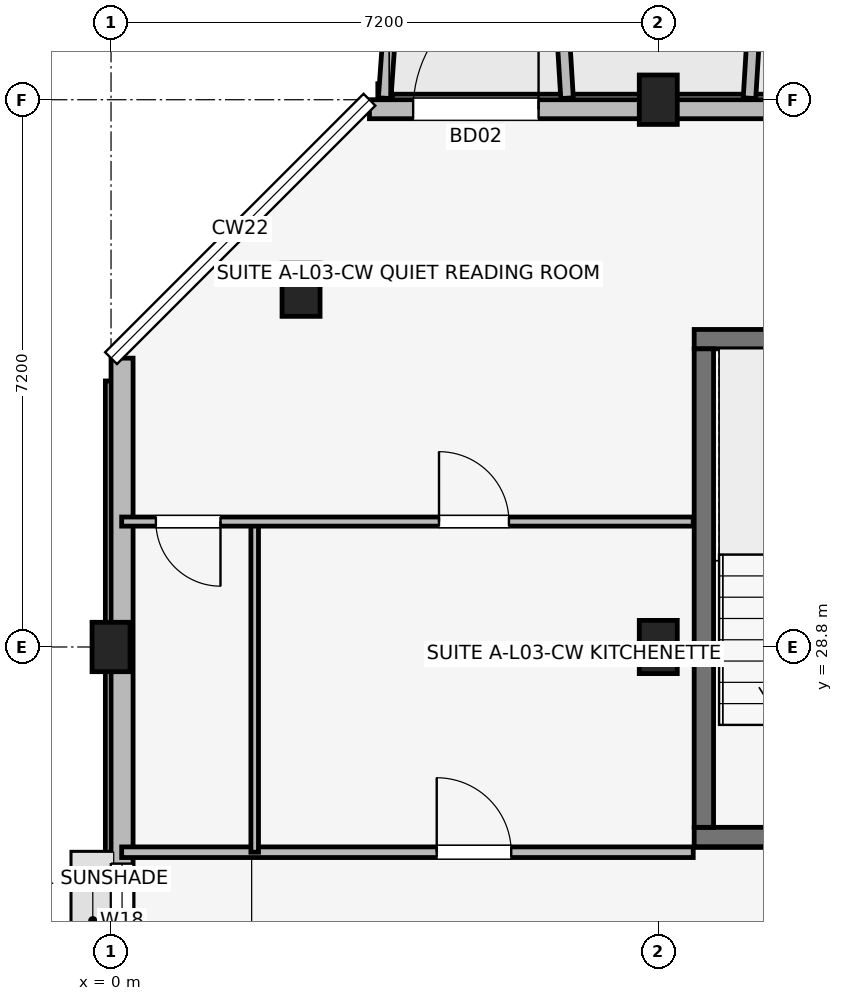
"""IFC4 building model, lengths in metres.
Left out: names, types, materials, properties, quantities, classifications, styles, units other than length and angle.
Written with IfcOpenShell. Run it as: python <this file> out.ifc"""

import sys

from ifc_helpers import new_model, si_unit, direction, frame, frame_2d, origin, origin_2d, place, context, subcontext, project, spatial, rectangle, extrude, element, fill, save


model = new_model("IFC4")
c1 = context("Model", 3, precision=1e-05, world=origin(), true_north=direction((0.0, 1.0)))
c2 = subcontext(c1, "Body", "Model", "MODEL_VIEW")
j1 = project(units=[si_unit("LENGTHUNIT", "METRE"), si_unit("PLANEANGLEUNIT", "RADIAN")], contexts=[c1])
p1 = place(None, origin())
s1 = spatial("IfcSite", under=j1, at=p1, CompositionType="ELEMENT")
p2 = place(p1, origin())
s2 = spatial("IfcBuilding", under=s1, at=p2, CompositionType="ELEMENT")
p3 = place(p2, frame((0.0, 0.0, 11.85)))
s3 = spatial("IfcBuildingStorey", under=s2, at=p3, CompositionType="ELEMENT", Elevation=11.85)
p4 = place(p3, frame((0.0, 28.8, 0.0), z_axis=(0.0, 0.0, 1.0), x_axis=(1.0, 0.0, 0.0)))
e1 = element("IfcColumn", 1, at=p4, inside=s3, PredefinedType="COLUMN", context=c2, shape_type="SweptSolid", body=[
    extrude(rectangle(XDim=0.5, YDim=0.65, at=origin_2d()), origin(), (0.0, 0.0, 1.0), 3.15),
])
for number, where, z_axis, x_axis in (
    (2, (2.5, 33.5, 0.0), (0.0, 0.0, 1.0), (1.0, 0.0, 0.0)),
    (3, (7.2, 28.8, 0.0), (0.0, 0.0, 1.0), (1.0, 0.0, 0.0)),
):
    element("IfcColumn", number, at=place(p3, frame(where, z_axis=z_axis, x_axis=x_axis)), inside=s3, PredefinedType="COLUMN", context=c2, shape_type="SweptSolid", body=[
        extrude(rectangle(XDim=0.5, YDim=0.7, at=origin_2d()), origin(), (0.0, 0.0, 1.0), 3.15),
    ])
p5 = place(p3, frame((7.2, 36.0, 0.0), z_axis=(0.0, 0.0, 1.0), x_axis=(1.0, 0.0, 0.0)))
e4 = element("IfcColumn", 4, at=p5, inside=s3, PredefinedType="COLUMN", context=c2, shape_type="SweptSolid", body=[
    extrude(rectangle(XDim=0.5, YDim=0.65, at=origin_2d()), origin(), (0.0, 0.0, 1.0), 3.15),
])
p6 = place(p3, frame((7.673, 26.3, 0.0), z_axis=(0.0, 0.0, 1.0), x_axis=(1.0, 0.0, 0.0)))
e5 = element("IfcWall", 5, at=p6, inside=s3, PredefinedType="SHEAR", context=c2, shape_type="SweptSolid", body=[
    extrude(rectangle(XDim=3.305, YDim=0.255, at=frame_2d((1.652, 0.0))), origin(), (0.0, 0.0, 1.0), 3.15),
])
p7 = place(p6, frame((2.177, 0.0, 0.0), z_axis=(0.0, 0.0, 1.0), x_axis=(-1.0, 0.0, 0.0)))
e6 = element("IfcOpeningElement", 6, at=p7, cuts=e5, PredefinedType="OPENING", context=c2, shape_type="SweptSolid", body=[
    extrude(rectangle(XDim=1.05, YDim=2.12, at=frame_2d((0.525, 1.06))), frame((0.0, 0.137, 0.0), z_axis=(0.0, -1.0, 0.0), x_axis=(1.0, 0.0, 0.0)), (0.0, 0.0, 1.0), 0.275),
])
p8 = place(p3, frame((7.673, 32.85, 0.0), z_axis=(0.0, 0.0, 1.0), x_axis=(1.0, 0.0, 0.0)))
e7 = element("IfcWall", 7, at=p8, inside=s3, PredefinedType="SHEAR", context=c2, shape_type="SweptSolid", body=[
    extrude(rectangle(XDim=3.305, YDim=0.255, at=frame_2d((1.652, 0.0))), origin(), (0.0, 0.0, 1.0), 3.15),
])
p9 = place(p3, frame((7.8, 26.427, 0.0), z_axis=(0.0, 0.0, 1.0), x_axis=(0.0, 1.0, 0.0)))
e8 = element("IfcWall", 8, at=p9, inside=s3, PredefinedType="SHEAR", context=c2, shape_type="SweptSolid", body=[
    extrude(rectangle(XDim=6.295, YDim=0.255, at=frame_2d((3.147, 0.0))), origin(), (0.0, 0.0, 1.0), 3.15),
])
p10 = place(p3, frame((32.6, 35.875, 0.0), z_axis=(0.0, 0.0, 1.0), x_axis=(-1.0, 0.0, 0.0)))
e9 = element("IfcWall", 9, at=p10, inside=s3, PredefinedType="SOLIDWALL", context=c2, shape_type="SweptSolid", body=[
    extrude(rectangle(XDim=29.2, YDim=0.25, at=frame_2d((14.6, 0.0))), origin(), (0.0, 0.0, 1.0), 2.43),
])
p11 = place(p10, frame((28.625, 0.0, 0.0), z_axis=(0.0, 0.0, 1.0), x_axis=(-1.0, 0.0, 0.0)))
e10 = element("IfcOpeningElement", 10, at=p11, cuts=e9, PredefinedType="OPENING", context=c2, shape_type="SweptSolid", body=[
    extrude(rectangle(XDim=1.65, YDim=2.15, at=frame_2d((0.825, 1.075))), frame((0.0, 0.135, 0.0), z_axis=(0.0, -1.0, 0.0), x_axis=(1.0, 0.0, 0.0)), (0.0, 0.0, 1.0), 0.27),
])
p12 = place(p10, frame((2.3, 0.0, 0.0), z_axis=(0.0, 0.0, 1.0), x_axis=(-1.0, 0.0, 0.0)))
e11 = element("IfcOpeningElement", 11, at=p12, cuts=e9, PredefinedType="OPENING", context=c2, shape_type="SweptSolid", body=[
    extrude(rectangle(XDim=1.8, YDim=2.15, at=frame_2d((0.9, 1.075))), frame((0.0, 0.135, 0.0), z_axis=(0.0, -1.0, 0.0), x_axis=(1.0, 0.0, 0.0)), (0.0, 0.0, 1.0), 0.27),
])
p13 = place(p10, frame((15.03, 0.0, 0.5)))
e12 = element("IfcOpeningElement", 12, at=p13, cuts=e9, PredefinedType="OPENING", context=c2, shape_type="SweptSolid", body=[
    extrude(rectangle(XDim=0.75, YDim=1.75, at=frame_2d((0.375, 0.875))), frame((0.0, 0.135, 0.0), z_axis=(0.0, -1.0, 0.0), x_axis=(1.0, 0.0, 0.0)), (0.0, 0.0, 1.0), 0.27),
])
p14 = place(p10, frame((7.675, 0.0, 0.67)))
e13 = element("IfcOpeningElement", 13, at=p14, cuts=e9, PredefinedType="OPENING", context=c2, shape_type="SweptSolid", body=[
    extrude(rectangle(XDim=2.0, YDim=1.65, at=frame_2d((1.0, 0.825))), frame((0.0, 0.135, 0.0), z_axis=(0.0, -1.0, 0.0), x_axis=(1.0, 0.0, 0.0)), (0.0, 0.0, 1.0), 0.27),
])
p15 = place(p10, frame((19.57, 0.0, 0.7)))
e14 = element("IfcOpeningElement", 14, at=p15, cuts=e9, PredefinedType="OPENING", context=c2, shape_type="SweptSolid", body=[
    extrude(rectangle(XDim=1.86, YDim=1.6, at=frame_2d((0.93, 0.8))), frame((0.0, 0.135, 0.0), z_axis=(0.0, -1.0, 0.0), x_axis=(1.0, 0.0, 0.0)), (0.0, 0.0, 1.0), 0.27),
])
p16 = place(p3, frame((0.145, 32.6, 0.0), z_axis=(0.0, 0.0, 1.0), x_axis=(0.0, -1.0, 0.0)))
e15 = element("IfcWall", 15, at=p16, inside=s3, PredefinedType="SOLIDWALL", context=c2, shape_type="SweptSolid", body=[
    extrude(rectangle(XDim=14.8, YDim=0.29, at=frame_2d((7.4, 0.0))), origin(), (0.0, 0.0, 1.0), 2.38),
])
p17 = place(p16, frame((6.65, 0.0, 1.05)))
e16 = element("IfcOpeningElement", 16, at=p17, cuts=e15, PredefinedType="OPENING", context=c2, shape_type="SweptSolid", body=[
    extrude(rectangle(XDim=1.5, YDim=1.15, at=frame_2d((0.75, 0.575))), frame((0.0, 0.155, 0.0), z_axis=(0.0, -1.0, 0.0), x_axis=(1.0, 0.0, 0.0)), (0.0, 0.0, 1.0), 0.31),
])
p18 = place(p16, frame((12.385, 0.0, 0.72)))
e17 = element("IfcOpeningElement", 17, at=p18, cuts=e15, PredefinedType="OPENING", context=c2, shape_type="SweptSolid", body=[
    extrude(rectangle(XDim=1.3, YDim=1.55, at=frame_2d((0.65, 0.775))), frame((0.0, 0.155, 0.0), z_axis=(0.0, -1.0, 0.0), x_axis=(1.0, 0.0, 0.0)), (0.0, 0.0, 1.0), 0.31),
])
p19 = place(p3, frame((3.6, 36.02, 0.0), z_axis=(0.0, 0.0, 1.0), x_axis=(0.071194071069, 0.997462482625, 0.0)))
e18 = element("IfcWall", 18, at=p19, inside=s3, PredefinedType="ELEMENTEDWALL", context=c2, shape_type="SweptSolid", body=[
    extrude(rectangle(XDim=1.965, YDim=0.165, at=frame_2d((0.982, 0.0))), origin(), (0.0, 0.0, 1.0), 2.95),
])
p20 = place(p3, frame((6.0, 36.02, 0.0), z_axis=(0.0, 0.0, 1.0), x_axis=(-0.061170732449, 0.998127317276, 0.0)))
e19 = element("IfcWall", 19, at=p20, inside=s3, PredefinedType="ELEMENTEDWALL", context=c2, shape_type="SweptSolid", body=[
    extrude(rectangle(XDim=1.964, YDim=0.165, at=frame_2d((0.982, 0.0))), origin(), (0.0, 0.0, 1.0), 2.95),
])
p21 = place(p3, frame((8.4, 36.02, 0.0), z_axis=(0.0, 0.0, 1.0), x_axis=(0.061170732449, 0.998127317276, 0.0)))
e20 = element("IfcWall", 20, at=p21, inside=s3, PredefinedType="ELEMENTEDWALL", context=c2, shape_type="SweptSolid", body=[
    extrude(rectangle(XDim=1.964, YDim=0.165, at=frame_2d((0.982, 0.0))), origin(), (0.0, 0.0, 1.0), 2.58),
])
p22 = place(p3, frame((0.14, 26.1, 0.0), z_axis=(0.0, 0.0, 1.0), x_axis=(1.0, 0.0, 0.0)))
e21 = element("IfcWall", 21, at=p22, inside=s3, PredefinedType="PARTITIONING", context=c2, shape_type="SweptSolid", body=[
    extrude(rectangle(XDim=7.52, YDim=0.14, at=frame_2d((3.76, 0.0))), origin(), (0.0, 0.0, 1.0), 2.38),
])
p23 = place(p22, frame((4.145, 0.0, 0.0)))
e22 = element("IfcOpeningElement", 22, at=p23, cuts=e21, PredefinedType="OPENING", context=c2, shape_type="SweptSolid", body=[
    extrude(rectangle(XDim=0.98, YDim=2.1, at=frame_2d((0.49, 1.05))), frame((0.0, 0.08, 0.0), z_axis=(0.0, -1.0, 0.0), x_axis=(1.0, 0.0, 0.0)), (0.0, 0.0, 1.0), 0.16),
])
p24 = place(p3, frame((1.89, 26.1, 0.0), z_axis=(0.0, 0.0, 1.0), x_axis=(0.0, 1.0, 0.0)))
e23 = element("IfcWall", 23, at=p24, inside=s3, PredefinedType="PARTITIONING", context=c2, shape_type="SweptSolid", body=[
    extrude(rectangle(XDim=4.35, YDim=0.1, at=frame_2d((2.175, 0.0))), origin(), (0.0, 0.0, 1.0), 2.375),
])
p25 = place(p3, frame((0.14, 30.45, 0.0), z_axis=(0.0, 0.0, 1.0), x_axis=(1.0, 0.0, 0.0)))
e24 = element("IfcWall", 24, at=p25, inside=s3, PredefinedType="PARTITIONING", context=c2, shape_type="SweptSolid", body=[
    extrude(rectangle(XDim=7.52, YDim=0.12, at=frame_2d((3.76, 0.0))), origin(), (0.0, 0.0, 1.0), 2.38),
])
p26 = place(p25, frame((1.3, 0.0, 0.0), z_axis=(0.0, 0.0, 1.0), x_axis=(-1.0, 0.0, 0.0)))
e25 = element("IfcOpeningElement", 25, at=p26, cuts=e24, PredefinedType="OPENING", context=c2, shape_type="SweptSolid", body=[
    extrude(rectangle(XDim=0.85, YDim=2.08, at=frame_2d((0.425, 1.04))), frame((0.0, 0.07, 0.0), z_axis=(0.0, -1.0, 0.0), x_axis=(1.0, 0.0, 0.0)), (0.0, 0.0, 1.0), 0.14),
])
p27 = place(p25, frame((4.175, 0.0, 0.0)))
e26 = element("IfcOpeningElement", 26, at=p27, cuts=e24, PredefinedType="OPENING", context=c2, shape_type="SweptSolid", body=[
    extrude(rectangle(XDim=0.92, YDim=2.08, at=frame_2d((0.46, 1.04))), frame((0.0, 0.07, 0.0), z_axis=(0.0, -1.0, 0.0), x_axis=(1.0, 0.0, 0.0)), (0.0, 0.0, 1.0), 0.14),
])
p28 = place(p11, origin())
e27 = element("IfcDoor", 27, at=p28, inside=s3, OperationType="SINGLE_SWING_LEFT", PredefinedType="DOOR", context=c2, shape_type="SweptSolid", body=[
    extrude(rectangle(XDim=1.65, YDim=2.15, at=frame_2d((0.825, 1.075))), frame((0.0, 0.025, 0.0), z_axis=(0.0, -1.0, 0.0), x_axis=(1.0, 0.0, 0.0)), (0.0, 0.0, 1.0), 0.05),
])
fill(e10, e27)
p29 = place(p17, origin())
e28 = element("IfcWindow", 28, at=p29, inside=s3, PartitioningType="SINGLE_PANEL", PredefinedType="WINDOW", context=c2, shape_type="SweptSolid", body=[
    extrude(rectangle(XDim=1.5, YDim=1.15, at=frame_2d((0.75, 0.575))), frame((0.0, 0.03, 0.0), z_axis=(0.0, -1.0, 0.0), x_axis=(1.0, 0.0, 0.0)), (0.0, 0.0, 1.0), 0.06),
])
fill(e16, e28)
p30 = place(p23, origin())
e29 = element("IfcDoor", 29, at=p30, inside=s3, OperationType="SINGLE_SWING_LEFT", PredefinedType="DOOR", context=c2, shape_type="SweptSolid", body=[
    extrude(rectangle(XDim=0.98, YDim=2.1, at=frame_2d((0.49, 1.05))), frame((0.0, 0.025, 0.0), z_axis=(0.0, -1.0, 0.0), x_axis=(1.0, 0.0, 0.0)), (0.0, 0.0, 1.0), 0.05),
])
fill(e22, e29)
p31 = place(p26, origin())
e30 = element("IfcDoor", 30, at=p31, inside=s3, OperationType="SINGLE_SWING_RIGHT", PredefinedType="DOOR", context=c2, shape_type="SweptSolid", body=[
    extrude(rectangle(XDim=0.85, YDim=2.08, at=frame_2d((0.425, 1.04))), frame((0.0, 0.025, 0.0), z_axis=(0.0, -1.0, 0.0), x_axis=(1.0, 0.0, 0.0)), (0.0, 0.0, 1.0), 0.05),
])
fill(e25, e30)
p32 = place(p27, origin())
e31 = element("IfcDoor", 31, at=p32, inside=s3, OperationType="SINGLE_SWING_LEFT", PredefinedType="DOOR", context=c2, shape_type="SweptSolid", body=[
    extrude(rectangle(XDim=0.92, YDim=2.08, at=frame_2d((0.46, 1.04))), frame((0.0, 0.025, 0.0), z_axis=(0.0, -1.0, 0.0), x_axis=(1.0, 0.0, 0.0)), (0.0, 0.0, 1.0), 0.05),
])
fill(e26, e31)
save(model, sys.argv[1])
